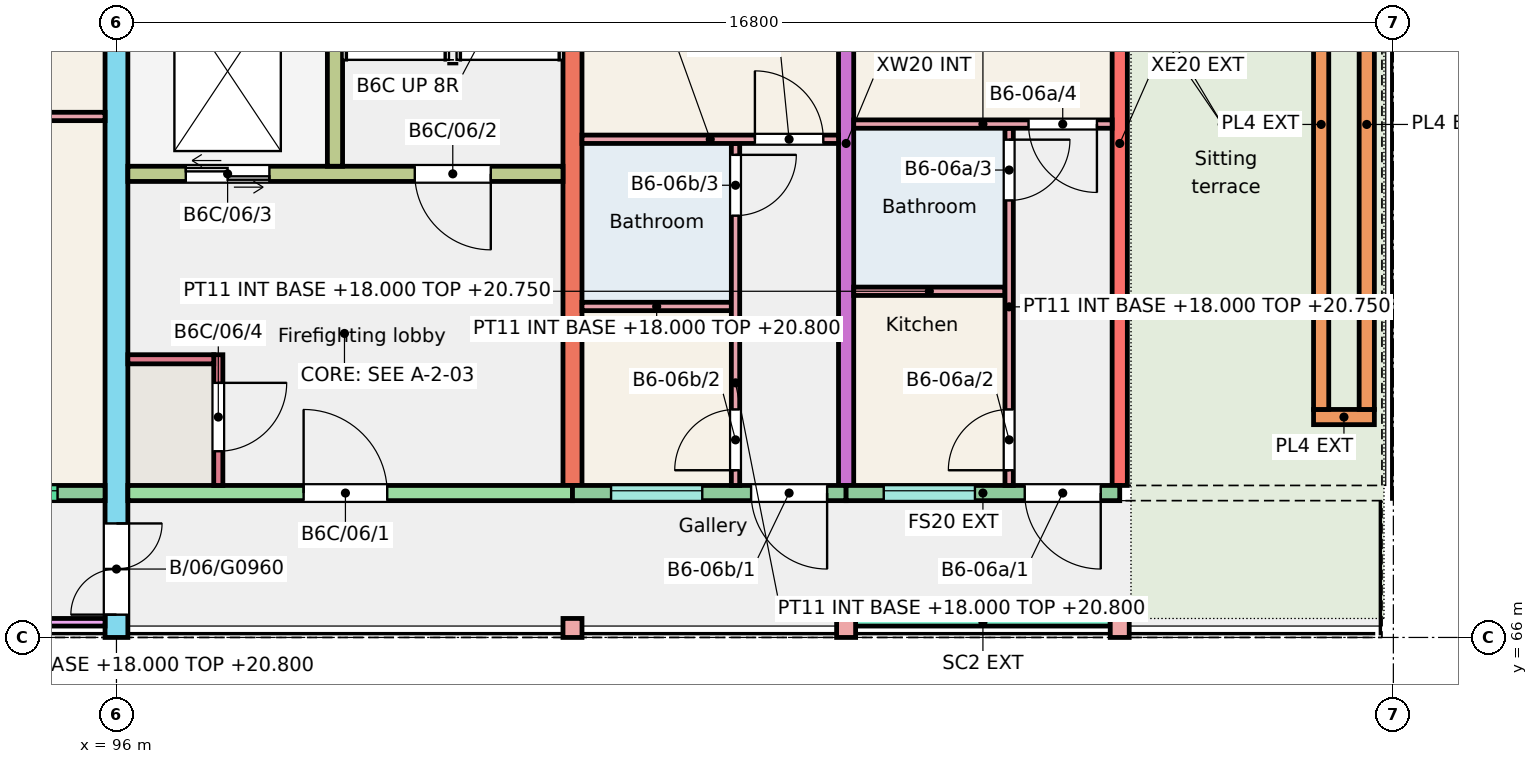
"""IFC4 building model, lengths in metres.
Left out: names, types, materials, properties, quantities, classifications, styles, units other than length and angle.
Written with IfcOpenShell. Run it as: python <this file> out.ifc"""

import sys

from ifc_helpers import new_model, si_unit, direction, frame, frame_2d, origin, origin_2d, place, context, subcontext, project, spatial, rectangle, extrude, element, fill, save


model = new_model("IFC4")
c1 = context("Model", 3, precision=1e-05, world=origin(), true_north=direction((0.0, 1.0)))
c2 = subcontext(c1, "Body", "Model", "MODEL_VIEW")
j1 = project(units=[si_unit("LENGTHUNIT", "METRE"), si_unit("PLANEANGLEUNIT", "RADIAN")], contexts=[c1])
p1 = place(None, origin())
s1 = spatial("IfcSite", under=j1, at=p1, CompositionType="ELEMENT")
p2 = place(p1, origin())
s2 = spatial("IfcBuilding", under=s1, at=p2, CompositionType="ELEMENT")
p3 = place(p2, frame((0.0, 0.0, 18.0)))
s3 = spatial("IfcBuildingStorey", under=s2, at=p3, CompositionType="ELEMENT", Elevation=18.0)
p4 = place(p3, frame((96.0, 66.0, 0.0), z_axis=(0.0, 0.0, 1.0), x_axis=(0.0, 1.0, 0.0)))
e1 = element("IfcWall", 1, at=p4, inside=s3, PredefinedType="SHEAR", context=c2, shape_type="SweptSolid", body=[
    extrude(rectangle(XDim=11.0, YDim=0.3, at=frame_2d((5.5, 0.0))), origin(), (0.0, 0.0, 1.0), 3.0),
])
p5 = place(p4, frame((0.3, 0.0, 0.0)))
e2 = element("IfcOpeningElement", 2, at=p5, cuts=e1, PredefinedType="OPENING", context=c2, shape_type="SweptSolid", body=[
    extrude(rectangle(XDim=1.2, YDim=2.1, at=frame_2d((0.6, 1.05))), frame((0.0, 0.16, 0.0), z_axis=(0.0, -1.0, 0.0), x_axis=(1.0, 0.0, 0.0)), (0.0, 0.0, 1.0), 0.32),
])
p6 = place(p3, frame((102.0, 68.0, 0.0), z_axis=(0.0, 0.0, 1.0), x_axis=(0.0, 1.0, 0.0)))
e3 = element("IfcWall", 3, at=p6, inside=s3, PredefinedType="SHEAR", context=c2, shape_type="SweptSolid", body=[
    extrude(rectangle(XDim=9.0, YDim=0.25, at=frame_2d((4.5, 0.0))), origin(), (0.0, 0.0, 1.0), 3.0),
])
p7 = place(p3, frame((105.6, 68.0, 0.0), z_axis=(0.0, 0.0, 1.0), x_axis=(0.0, 1.0, 0.0)))
e4 = element("IfcWall", 4, at=p7, inside=s3, PredefinedType="SHEAR", context=c2, shape_type="SweptSolid", body=[
    extrude(rectangle(XDim=9.0, YDim=0.2, at=frame_2d((4.5, 0.0))), origin(), (0.0, 0.0, 1.0), 3.0),
])
p8 = place(p3, frame((109.2, 68.0, 0.0), z_axis=(0.0, 0.0, 1.0), x_axis=(0.0, 1.0, 0.0)))
e5 = element("IfcWall", 5, at=p8, inside=s3, PredefinedType="SHEAR", context=c2, shape_type="SweptSolid", body=[
    extrude(rectangle(XDim=9.0, YDim=0.2, at=frame_2d((4.5, 0.0))), origin(), (0.0, 0.0, 1.0), 3.0),
])
p9 = place(p8, frame((7.653, 0.0, 0.9)))
e6 = element("IfcOpeningElement", 6, at=p9, cuts=e5, PredefinedType="OPENING", context=c2, shape_type="SweptSolid", body=[
    extrude(rectangle(XDim=1.2, YDim=1.5, at=frame_2d((0.6, 0.75))), frame((0.0, 0.11, 0.0), z_axis=(0.0, -1.0, 0.0), x_axis=(1.0, 0.0, 0.0)), (0.0, 0.0, 1.0), 0.22),
])
p10 = place(p8, frame((6.405, 0.0, 0.0)))
e7 = element("IfcOpeningElement", 7, at=p10, cuts=e5, PredefinedType="OPENING", context=c2, shape_type="SweptSolid", body=[
    extrude(rectangle(XDim=1.0, YDim=2.1, at=frame_2d((0.5, 1.05))), frame((0.0, 0.11, 0.0), z_axis=(0.0, -1.0, 0.0), x_axis=(1.0, 0.0, 0.0)), (0.0, 0.0, 1.0), 0.22),
])
p11 = place(p3, frame((92.4, 67.9, 0.0), z_axis=(0.0, 0.0, 1.0), x_axis=(1.0, 0.0, 0.0)))
e8 = element("IfcWall", 8, at=p11, inside=s3, PredefinedType="SOLIDWALL", context=c2, shape_type="SweptSolid", body=[
    extrude(rectangle(XDim=3.45, YDim=0.2, at=frame_2d((1.725, 0.0))), origin(), (0.0, 0.0, 1.0), 3.0),
])
p12 = place(p11, frame((0.725, 0.0, 1.2)))
e9 = element("IfcOpeningElement", 9, at=p12, cuts=e8, PredefinedType="OPENING", context=c2, shape_type="SweptSolid", body=[
    extrude(rectangle(XDim=2.1, YDim=1.2, at=frame_2d((1.05, 0.6))), frame((0.0, 0.11, 0.0), z_axis=(0.0, -1.0, 0.0), x_axis=(1.0, 0.0, 0.0)), (0.0, 0.0, 1.0), 0.22),
])
p13 = place(p3, frame((96.15, 67.9, 0.0), z_axis=(0.0, 0.0, 1.0), x_axis=(1.0, 0.0, 0.0)))
e10 = element("IfcWall", 10, at=p13, inside=s3, PredefinedType="SHEAR", context=c2, shape_type="SweptSolid", body=[
    extrude(rectangle(XDim=5.85, YDim=0.2, at=frame_2d((2.925, 0.0))), origin(), (0.0, 0.0, 1.0), 3.0),
])
p14 = place(p13, frame((2.312, 0.0, 0.0)))
e11 = element("IfcOpeningElement", 11, at=p14, cuts=e10, PredefinedType="OPENING", context=c2, shape_type="SweptSolid", body=[
    extrude(rectangle(XDim=1.1, YDim=2.1, at=frame_2d((0.55, 1.05))), frame((0.0, 0.11, 0.0), z_axis=(0.0, -1.0, 0.0), x_axis=(1.0, 0.0, 0.0)), (0.0, 0.0, 1.0), 0.22),
])
p15 = place(p3, frame((96.15, 72.1, 0.0), z_axis=(0.0, 0.0, 1.0), x_axis=(1.0, 0.0, 0.0)))
e12 = element("IfcWall", 12, at=p15, inside=s3, PredefinedType="SHEAR", context=c2, shape_type="SweptSolid", body=[
    extrude(rectangle(XDim=5.725, YDim=0.2, at=frame_2d((2.863, 0.0))), origin(), (0.0, 0.0, 1.0), 3.0),
])
p16 = place(p15, frame((3.775, 0.0, 0.0)))
e13 = element("IfcOpeningElement", 13, at=p16, cuts=e12, PredefinedType="OPENING", context=c2, shape_type="SweptSolid", body=[
    extrude(rectangle(XDim=1.0, YDim=2.1, at=frame_2d((0.5, 1.05))), frame((0.0, 0.11, 0.0), z_axis=(0.0, -1.0, 0.0), x_axis=(1.0, 0.0, 0.0)), (0.0, 0.0, 1.0), 0.22),
])
p17 = place(p15, frame((0.762, 0.0, 0.0)))
e14 = element("IfcOpeningElement", 14, at=p17, cuts=e12, PredefinedType="OPENING", context=c2, shape_type="SweptSolid", body=[
    extrude(rectangle(XDim=1.1, YDim=2.1, at=frame_2d((0.55, 1.05))), frame((0.0, 0.11, 0.0), z_axis=(0.0, -1.0, 0.0), x_axis=(1.0, 0.0, 0.0)), (0.0, 0.0, 1.0), 0.22),
])
p18 = place(p3, frame((98.875, 72.2, 0.0), z_axis=(0.0, 0.0, 1.0), x_axis=(0.0, 1.0, 0.0)))
e15 = element("IfcWall", 15, at=p18, inside=s3, PredefinedType="SHEAR", context=c2, shape_type="SweptSolid", body=[
    extrude(rectangle(XDim=4.8, YDim=0.2, at=frame_2d((2.4, 0.0))), origin(), (0.0, 0.0, 1.0), 3.0),
])
p19 = place(p3, frame((97.34, 68.0, 0.0), z_axis=(0.0, 0.0, 1.0), x_axis=(0.0, 1.0, 0.0)))
e16 = element("IfcWall", 16, at=p19, inside=s3, PredefinedType="SHEAR", context=c2, shape_type="SweptSolid", body=[
    extrude(rectangle(XDim=1.72, YDim=0.12, at=frame_2d((0.86, 0.0))), origin(), (0.0, 0.0, 1.0), 3.0),
])
p20 = place(p19, frame((0.45, 0.0, 0.0)))
e17 = element("IfcOpeningElement", 17, at=p20, cuts=e16, PredefinedType="OPENING", context=c2, shape_type="SweptSolid", body=[
    extrude(rectangle(XDim=0.9, YDim=2.1, at=frame_2d((0.45, 1.05))), frame((0.0, 0.07, 0.0), z_axis=(0.0, -1.0, 0.0), x_axis=(1.0, 0.0, 0.0)), (0.0, 0.0, 1.0), 0.14),
])
p21 = place(p3, frame((96.15, 69.66, 0.0), z_axis=(0.0, 0.0, 1.0), x_axis=(1.0, 0.0, 0.0)))
e18 = element("IfcWall", 18, at=p21, inside=s3, PredefinedType="SHEAR", context=c2, shape_type="SweptSolid", body=[
    extrude(rectangle(XDim=1.13, YDim=0.12, at=frame_2d((0.565, 0.0))), origin(), (0.0, 0.0, 1.0), 3.0),
])
p22 = place(p3, frame((102.0, 67.9, 0.0), z_axis=(0.0, 0.0, 1.0), x_axis=(1.0, 0.0, 0.0)))
e19 = element("IfcWall", 19, at=p22, inside=s3, PredefinedType="SOLIDWALL", context=c2, shape_type="SweptSolid", body=[
    extrude(rectangle(XDim=3.6, YDim=0.2, at=frame_2d((1.8, 0.0))), origin(), (0.0, 0.0, 1.0), 3.0),
])
p23 = place(p22, frame((0.508, 0.0, 1.1)))
e20 = element("IfcOpeningElement", 20, at=p23, cuts=e19, PredefinedType="OPENING", context=c2, shape_type="SweptSolid", body=[
    extrude(rectangle(XDim=1.2, YDim=1.3, at=frame_2d((0.6, 0.65))), frame((0.0, 0.11, 0.0), z_axis=(0.0, -1.0, 0.0), x_axis=(1.0, 0.0, 0.0)), (0.0, 0.0, 1.0), 0.22),
])
p24 = place(p22, frame((2.35, 0.0, 0.0)))
e21 = element("IfcOpeningElement", 21, at=p24, cuts=e19, PredefinedType="OPENING", context=c2, shape_type="SweptSolid", body=[
    extrude(rectangle(XDim=1.0, YDim=2.1, at=frame_2d((0.5, 1.05))), frame((0.0, 0.11, 0.0), z_axis=(0.0, -1.0, 0.0), x_axis=(1.0, 0.0, 0.0)), (0.0, 0.0, 1.0), 0.22),
])
p25 = place(p3, frame((105.6, 67.9, 0.0), z_axis=(0.0, 0.0, 1.0), x_axis=(1.0, 0.0, 0.0)))
e22 = element("IfcWall", 22, at=p25, inside=s3, PredefinedType="SOLIDWALL", context=c2, shape_type="SweptSolid", body=[
    extrude(rectangle(XDim=3.6, YDim=0.2, at=frame_2d((1.8, 0.0))), origin(), (0.0, 0.0, 1.0), 3.0),
])
p26 = place(p25, frame((0.495, 0.0, 1.1)))
e23 = element("IfcOpeningElement", 23, at=p26, cuts=e22, PredefinedType="OPENING", context=c2, shape_type="SweptSolid", body=[
    extrude(rectangle(XDim=1.2, YDim=1.3, at=frame_2d((0.6, 0.65))), frame((0.0, 0.11, 0.0), z_axis=(0.0, -1.0, 0.0), x_axis=(1.0, 0.0, 0.0)), (0.0, 0.0, 1.0), 0.22),
])
p27 = place(p25, frame((2.35, 0.0, 0.0)))
e24 = element("IfcOpeningElement", 24, at=p27, cuts=e22, PredefinedType="OPENING", context=c2, shape_type="SweptSolid", body=[
    extrude(rectangle(XDim=1.0, YDim=2.1, at=frame_2d((0.5, 1.05))), frame((0.0, 0.11, 0.0), z_axis=(0.0, -1.0, 0.0), x_axis=(1.0, 0.0, 0.0)), (0.0, 0.0, 1.0), 0.22),
])
for number, where, z_axis, x_axis in (
    (25, (102.0, 66.125, 0.0), (0.0, 0.0, 1.0), (1.0, 0.0, 0.0)),
    (26, (105.6, 66.125, 0.0), (0.0, 0.0, 1.0), (1.0, 0.0, 0.0)),
    (27, (109.2, 66.125, 0.0), (0.0, 0.0, 1.0), (1.0, 0.0, 0.0)),
):
    element("IfcColumn", number, at=place(p3, frame(where, z_axis=z_axis, x_axis=x_axis)), inside=s3, PredefinedType="COLUMN", context=c2, shape_type="SweptSolid", body=[
        extrude(rectangle(XDim=0.25, YDim=0.25, at=origin_2d()), origin(), (0.0, 0.0, 1.0), 3.0),
    ])
p28 = place(p3, frame((111.75, 68.9, 0.01), z_axis=(0.0, 0.0, 1.0), x_axis=(1.0, 0.0, 0.0)))
e28 = element("IfcWall", 28, at=p28, inside=s3, PredefinedType="SOLIDWALL", context=c2, shape_type="SweptSolid", body=[
    extrude(rectangle(XDim=0.8, YDim=0.2, at=frame_2d((0.4, 0.0))), origin(), (0.0, 0.0, 1.0), 0.45),
])
for number, where, z_axis, x_axis in (
    (29, (111.85, 69.0, 0.01), (0.0, 0.0, 1.0), (0.0, 1.0, 0.0)),
    (30, (112.45, 69.0, 0.01), (0.0, 0.0, 1.0), (0.0, 1.0, 0.0)),
):
    element("IfcWall", number, at=place(p3, frame(where, z_axis=z_axis, x_axis=x_axis)), inside=s3, PredefinedType="SOLIDWALL", context=c2, shape_type="SweptSolid", body=[
        extrude(rectangle(XDim=7.5, YDim=0.2, at=frame_2d((3.75, 0.0))), origin(), (0.0, 0.0, 1.0), 0.45),
    ])
p29 = place(p3, frame((92.525, 66.2, 0.0), z_axis=(0.0, 0.0, 1.0), x_axis=(1.0, 0.0, 0.0)))
e31 = element("IfcWall", 31, at=p29, inside=s3, PredefinedType="SOLIDWALL", context=c2, shape_type="SweptSolid", body=[
    extrude(rectangle(XDim=3.325, YDim=0.1, at=frame_2d((1.663, 0.0))), origin(), (0.0, 0.0, 1.0), 2.45),
])
p30 = place(p3, frame((105.725, 66.2, 0.0), z_axis=(0.0, 0.0, 1.0), x_axis=(1.0, 0.0, 0.0)))
e32 = element("IfcWall", 32, at=p30, inside=s3, PredefinedType="SOLIDWALL", context=c2, shape_type="SweptSolid", body=[
    extrude(rectangle(XDim=3.35, YDim=0.1, at=frame_2d((1.675, 0.0))), origin(), (0.0, 0.0, 1.0), 2.45),
])
p31 = place(p3, frame((92.5, 72.855, 0.0), z_axis=(0.0, 0.0, 1.0), x_axis=(1.0, 0.0, 0.0)))
e33 = element("IfcWall", 33, at=p31, inside=s3, PredefinedType="PARTITIONING", context=c2, shape_type="SweptSolid", body=[
    extrude(rectangle(XDim=3.35, YDim=0.11, at=frame_2d((1.675, 0.0))), origin(), (0.0, 0.0, 1.0), 2.75),
])
p32 = place(p3, frame((105.7, 70.555, 0.0), z_axis=(0.0, 0.0, 1.0), x_axis=(1.0, 0.0, 0.0)))
e34 = element("IfcWall", 34, at=p32, inside=s3, PredefinedType="PARTITIONING", context=c2, shape_type="SweptSolid", body=[
    extrude(rectangle(XDim=1.99, YDim=0.11, at=frame_2d((0.995, 0.0))), origin(), (0.0, 0.0, 1.0), 2.75),
])
p33 = place(p3, frame((107.745, 68.0, 0.0), z_axis=(0.0, 0.0, 1.0), x_axis=(0.0, 1.0, 0.0)))
e35 = element("IfcWall", 35, at=p33, inside=s3, PredefinedType="PARTITIONING", context=c2, shape_type="SweptSolid", body=[
    extrude(rectangle(XDim=4.7, YDim=0.11, at=frame_2d((2.35, 0.0))), origin(), (0.0, 0.0, 1.0), 2.75),
])
p34 = place(p33, frame((0.2, 0.0, 0.0)))
e36 = element("IfcOpeningElement", 36, at=p34, cuts=e35, PredefinedType="OPENING", context=c2, shape_type="SweptSolid", body=[
    extrude(rectangle(XDim=0.8, YDim=2.1, at=frame_2d((0.4, 1.05))), frame((0.0, 0.065, 0.0), z_axis=(0.0, -1.0, 0.0), x_axis=(1.0, 0.0, 0.0)), (0.0, 0.0, 1.0), 0.13),
])
p35 = place(p33, frame((3.75, 0.0, 0.0)))
e37 = element("IfcOpeningElement", 37, at=p35, cuts=e35, PredefinedType="OPENING", context=c2, shape_type="SweptSolid", body=[
    extrude(rectangle(XDim=0.8, YDim=2.1, at=frame_2d((0.4, 1.05))), frame((0.0, 0.065, 0.0), z_axis=(0.0, -1.0, 0.0), x_axis=(1.0, 0.0, 0.0)), (0.0, 0.0, 1.0), 0.13),
])
p36 = place(p3, frame((105.7, 72.755, 0.0), z_axis=(0.0, 0.0, 1.0), x_axis=(1.0, 0.0, 0.0)))
e38 = element("IfcWall", 38, at=p36, inside=s3, PredefinedType="PARTITIONING", context=c2, shape_type="SweptSolid", body=[
    extrude(rectangle(XDim=3.4, YDim=0.11, at=frame_2d((1.7, 0.0))), origin(), (0.0, 0.0, 1.0), 2.75),
])
p37 = place(p36, frame((2.3, 0.0, 0.0)))
e39 = element("IfcOpeningElement", 39, at=p37, cuts=e38, PredefinedType="OPENING", context=c2, shape_type="SweptSolid", body=[
    extrude(rectangle(XDim=0.9, YDim=2.1, at=frame_2d((0.45, 1.05))), frame((0.0, 0.065, 0.0), z_axis=(0.0, -1.0, 0.0), x_axis=(1.0, 0.0, 0.0)), (0.0, 0.0, 1.0), 0.13),
])
p38 = place(p3, frame((102.125, 70.355, 0.0), z_axis=(0.0, 0.0, 1.0), x_axis=(1.0, 0.0, 0.0)))
e40 = element("IfcWall", 40, at=p38, inside=s3, PredefinedType="PARTITIONING", context=c2, shape_type="SweptSolid", body=[
    extrude(rectangle(XDim=1.965, YDim=0.11, at=frame_2d((0.982, 0.0))), origin(), (0.0, 0.0, 1.0), 2.8),
])
p39 = place(p3, frame((104.145, 68.0, 0.0), z_axis=(0.0, 0.0, 1.0), x_axis=(0.0, 1.0, 0.0)))
e41 = element("IfcWall", 41, at=p39, inside=s3, PredefinedType="PARTITIONING", context=c2, shape_type="SweptSolid", body=[
    extrude(rectangle(XDim=4.5, YDim=0.11, at=frame_2d((2.25, 0.0))), origin(), (0.0, 0.0, 1.0), 2.8),
])
p40 = place(p39, frame((0.2, 0.0, 0.0)))
e42 = element("IfcOpeningElement", 42, at=p40, cuts=e41, PredefinedType="OPENING", context=c2, shape_type="SweptSolid", body=[
    extrude(rectangle(XDim=0.8, YDim=2.1, at=frame_2d((0.4, 1.05))), frame((0.0, 0.065, 0.0), z_axis=(0.0, -1.0, 0.0), x_axis=(1.0, 0.0, 0.0)), (0.0, 0.0, 1.0), 0.13),
])
p41 = place(p39, frame((3.55, 0.0, 0.0)))
e43 = element("IfcOpeningElement", 43, at=p41, cuts=e41, PredefinedType="OPENING", context=c2, shape_type="SweptSolid", body=[
    extrude(rectangle(XDim=0.8, YDim=2.1, at=frame_2d((0.4, 1.05))), frame((0.0, 0.065, 0.0), z_axis=(0.0, -1.0, 0.0), x_axis=(1.0, 0.0, 0.0)), (0.0, 0.0, 1.0), 0.13),
])
p42 = place(p3, frame((102.125, 72.555, 0.0), z_axis=(0.0, 0.0, 1.0), x_axis=(1.0, 0.0, 0.0)))
e44 = element("IfcWall", 44, at=p42, inside=s3, PredefinedType="PARTITIONING", context=c2, shape_type="SweptSolid", body=[
    extrude(rectangle(XDim=3.375, YDim=0.11, at=frame_2d((1.688, 0.0))), origin(), (0.0, 0.0, 1.0), 2.8),
])
p43 = place(p42, frame((2.275, 0.0, 0.0)))
e45 = element("IfcOpeningElement", 45, at=p43, cuts=e44, PredefinedType="OPENING", context=c2, shape_type="SweptSolid", body=[
    extrude(rectangle(XDim=0.9, YDim=2.1, at=frame_2d((0.45, 1.05))), frame((0.0, 0.065, 0.0), z_axis=(0.0, -1.0, 0.0), x_axis=(1.0, 0.0, 0.0)), (0.0, 0.0, 1.0), 0.13),
])
p44 = place(p12, origin())
e46 = element("IfcWindow", 46, at=p44, inside=s3, PartitioningType="SINGLE_PANEL", PredefinedType="WINDOW", context=c2, shape_type="SweptSolid", body=[
    extrude(rectangle(XDim=2.1, YDim=1.2, at=frame_2d((1.05, 0.6))), frame((0.0, 0.06, 0.0), z_axis=(0.0, -1.0, 0.0), x_axis=(1.0, 0.0, 0.0)), (0.0, 0.0, 1.0), 0.06),
])
fill(e9, e46)
p45 = place(p26, origin())
e47 = element("IfcWindow", 47, at=p45, inside=s3, PartitioningType="SINGLE_PANEL", PredefinedType="WINDOW", context=c2, shape_type="SweptSolid", body=[
    extrude(rectangle(XDim=1.2, YDim=1.3, at=frame_2d((0.6, 0.65))), frame((0.0, 0.06, 0.0), z_axis=(0.0, -1.0, 0.0), x_axis=(1.0, 0.0, 0.0)), (0.0, 0.0, 1.0), 0.06),
])
fill(e23, e47)
p46 = place(p23, origin())
e48 = element("IfcWindow", 48, at=p46, inside=s3, PartitioningType="SINGLE_PANEL", PredefinedType="WINDOW", context=c2, shape_type="SweptSolid", body=[
    extrude(rectangle(XDim=1.2, YDim=1.3, at=frame_2d((0.6, 0.65))), frame((0.0, 0.06, 0.0), z_axis=(0.0, -1.0, 0.0), x_axis=(1.0, 0.0, 0.0)), (0.0, 0.0, 1.0), 0.06),
])
fill(e20, e48)
p47 = place(p27, origin())
e49 = element("IfcDoor", 49, at=p47, inside=s3, OperationType="SINGLE_SWING_RIGHT", PredefinedType="DOOR", context=c2, shape_type="SweptSolid", body=[
    extrude(rectangle(XDim=1.0, YDim=2.1, at=frame_2d((0.5, 1.05))), frame((0.0, 0.025, 0.0), z_axis=(0.0, -1.0, 0.0), x_axis=(1.0, 0.0, 0.0)), (0.0, 0.0, 1.0), 0.05),
])
fill(e24, e49)
p48 = place(p34, origin())
e50 = element("IfcDoor", 50, at=p48, inside=s3, OperationType="SINGLE_SWING_LEFT", PredefinedType="DOOR", context=c2, shape_type="SweptSolid", body=[
    extrude(rectangle(XDim=0.8, YDim=2.1, at=frame_2d((0.4, 1.05))), frame((0.0, 0.025, 0.0), z_axis=(0.0, -1.0, 0.0), x_axis=(1.0, 0.0, 0.0)), (0.0, 0.0, 1.0), 0.05),
])
fill(e36, e50)
p49 = place(p35, origin())
e51 = element("IfcDoor", 51, at=p49, inside=s3, OperationType="SINGLE_SWING_RIGHT", PredefinedType="DOOR", context=c2, shape_type="SweptSolid", body=[
    extrude(rectangle(XDim=0.8, YDim=2.1, at=frame_2d((0.4, 1.05))), frame((0.0, 0.025, 0.0), z_axis=(0.0, -1.0, 0.0), x_axis=(1.0, 0.0, 0.0)), (0.0, 0.0, 1.0), 0.05),
])
fill(e37, e51)
p50 = place(p37, origin())
e52 = element("IfcDoor", 52, at=p50, inside=s3, OperationType="SINGLE_SWING_RIGHT", PredefinedType="DOOR", context=c2, shape_type="SweptSolid", body=[
    extrude(rectangle(XDim=0.9, YDim=2.1, at=frame_2d((0.45, 1.05))), frame((0.0, 0.025, 0.0), z_axis=(0.0, -1.0, 0.0), x_axis=(1.0, 0.0, 0.0)), (0.0, 0.0, 1.0), 0.05),
])
fill(e39, e52)
p51 = place(p24, origin())
e53 = element("IfcDoor", 53, at=p51, inside=s3, OperationType="SINGLE_SWING_RIGHT", PredefinedType="DOOR", context=c2, shape_type="SweptSolid", body=[
    extrude(rectangle(XDim=1.0, YDim=2.1, at=frame_2d((0.5, 1.05))), frame((0.0, 0.025, 0.0), z_axis=(0.0, -1.0, 0.0), x_axis=(1.0, 0.0, 0.0)), (0.0, 0.0, 1.0), 0.05),
])
fill(e21, e53)
p52 = place(p40, origin())
e54 = element("IfcDoor", 54, at=p52, inside=s3, OperationType="SINGLE_SWING_LEFT", PredefinedType="DOOR", context=c2, shape_type="SweptSolid", body=[
    extrude(rectangle(XDim=0.8, YDim=2.1, at=frame_2d((0.4, 1.05))), frame((0.0, 0.025, 0.0), z_axis=(0.0, -1.0, 0.0), x_axis=(1.0, 0.0, 0.0)), (0.0, 0.0, 1.0), 0.05),
])
fill(e42, e54)
p53 = place(p41, origin())
e55 = element("IfcDoor", 55, at=p53, inside=s3, OperationType="SINGLE_SWING_RIGHT", PredefinedType="DOOR", context=c2, shape_type="SweptSolid", body=[
    extrude(rectangle(XDim=0.8, YDim=2.1, at=frame_2d((0.4, 1.05))), frame((0.0, 0.025, 0.0), z_axis=(0.0, -1.0, 0.0), x_axis=(1.0, 0.0, 0.0)), (0.0, 0.0, 1.0), 0.05),
])
fill(e43, e55)
p54 = place(p43, origin())
e56 = element("IfcDoor", 56, at=p54, inside=s3, OperationType="SINGLE_SWING_LEFT", PredefinedType="DOOR", context=c2, shape_type="SweptSolid", body=[
    extrude(rectangle(XDim=0.9, YDim=2.1, at=frame_2d((0.45, 1.05))), frame((0.0, 0.025, 0.0), z_axis=(0.0, -1.0, 0.0), x_axis=(1.0, 0.0, 0.0)), (0.0, 0.0, 1.0), 0.05),
])
fill(e45, e56)
p55 = place(p14, origin())
e57 = element("IfcDoor", 57, at=p55, inside=s3, OperationType="SINGLE_SWING_LEFT", PredefinedType="DOOR", context=c2, shape_type="SweptSolid", body=[
    extrude(rectangle(XDim=1.1, YDim=2.1, at=frame_2d((0.55, 1.05))), frame((0.0, 0.025, 0.0), z_axis=(0.0, -1.0, 0.0), x_axis=(1.0, 0.0, 0.0)), (0.0, 0.0, 1.0), 0.05),
])
fill(e11, e57)
p56 = place(p16, origin())
e58 = element("IfcDoor", 58, at=p56, inside=s3, OperationType="SINGLE_SWING_RIGHT", PredefinedType="DOOR", context=c2, shape_type="SweptSolid", body=[
    extrude(rectangle(XDim=1.0, YDim=2.1, at=frame_2d((0.5, 1.05))), frame((0.0, 0.025, 0.0), z_axis=(0.0, -1.0, 0.0), x_axis=(1.0, 0.0, 0.0)), (0.0, 0.0, 1.0), 0.05),
])
fill(e13, e58)
p57 = place(p17, origin())
e59 = element("IfcDoor", 59, at=p57, inside=s3, OperationType="DOUBLE_DOOR_SLIDING", PredefinedType="DOOR", context=c2, shape_type="SweptSolid", body=[
    extrude(rectangle(XDim=1.1, YDim=2.1, at=frame_2d((0.55, 1.05))), frame((0.0, 0.025, 0.0), z_axis=(0.0, -1.0, 0.0), x_axis=(1.0, 0.0, 0.0)), (0.0, 0.0, 1.0), 0.05),
])
fill(e14, e59)
p58 = place(p20, origin())
e60 = element("IfcDoor", 60, at=p58, inside=s3, OperationType="SINGLE_SWING_RIGHT", PredefinedType="DOOR", context=c2, shape_type="SweptSolid", body=[
    extrude(rectangle(XDim=0.9, YDim=2.1, at=frame_2d((0.45, 1.05))), frame((0.0, 0.025, 0.0), z_axis=(0.0, -1.0, 0.0), x_axis=(1.0, 0.0, 0.0)), (0.0, 0.0, 1.0), 0.05),
])
fill(e17, e60)
p59 = place(p5, origin())
e61 = element("IfcDoor", 61, at=p59, inside=s3, OperationType="DOUBLE_DOOR_SINGLE_SWING", PredefinedType="DOOR", context=c2, shape_type="SweptSolid", body=[
    extrude(rectangle(XDim=1.2, YDim=2.1, at=frame_2d((0.6, 1.05))), frame((0.0, 0.025, 0.0), z_axis=(0.0, -1.0, 0.0), x_axis=(1.0, 0.0, 0.0)), (0.0, 0.0, 1.0), 0.05),
])
fill(e2, e61)
save(model, sys.argv[1])
